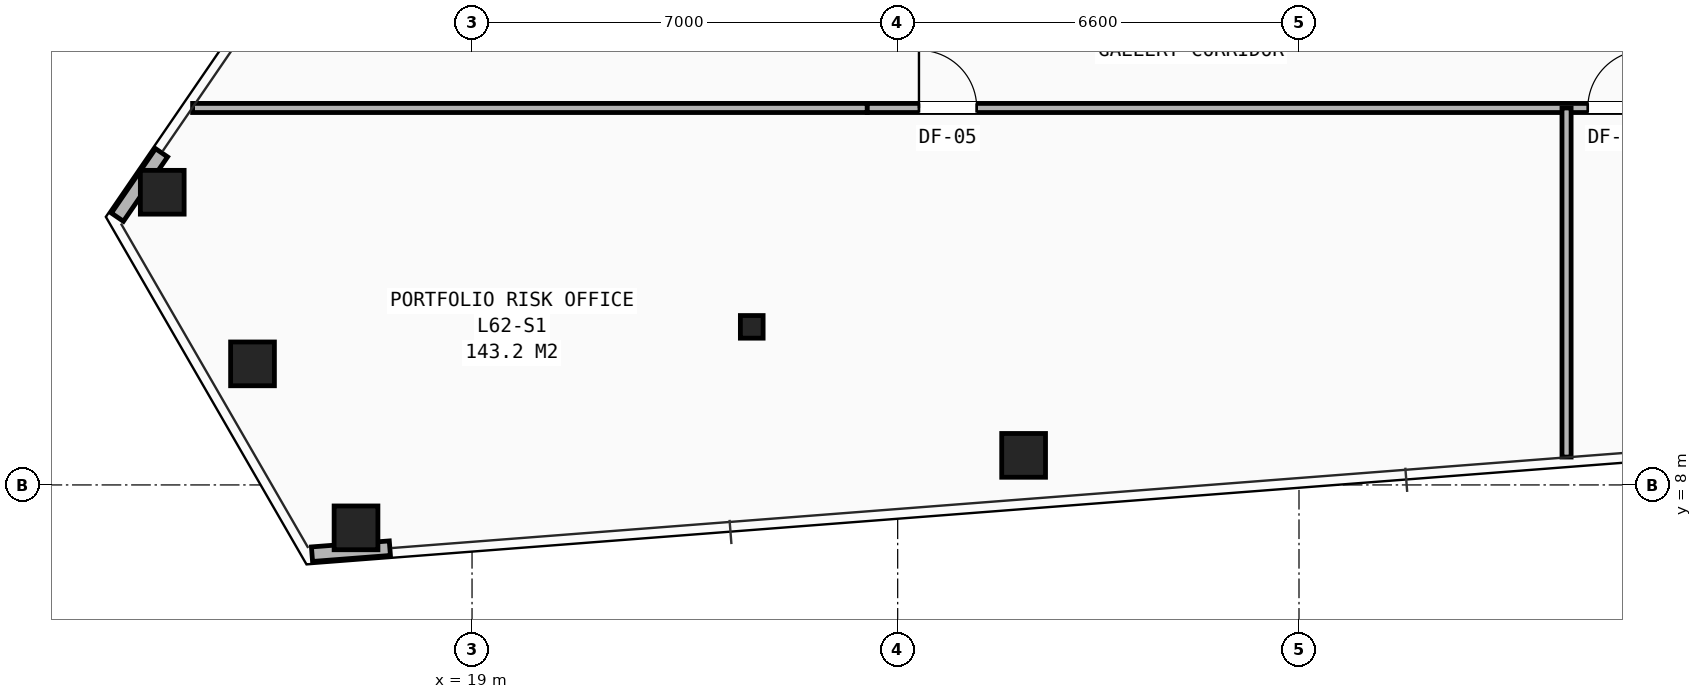
"""IFC4 building model, lengths in metres.
Left out: names, types, materials, properties, quantities, classifications, styles, units other than length and angle.
Written with IfcOpenShell. Run it as: python <this file> out.ifc"""

import sys

from ifc_helpers import new_model, si_unit, direction, frame, frame_2d, origin, origin_2d, place, context, subcontext, project, spatial, rectangle, hollow_rectangle, i_section, extrude, element, fill, save


model = new_model("IFC4")
c1 = context("Model", 3, precision=1e-05, world=origin(), true_north=direction((0.0, 1.0)))
c2 = subcontext(c1, "Body", "Model", "MODEL_VIEW")
j1 = project(units=[si_unit("LENGTHUNIT", "METRE"), si_unit("PLANEANGLEUNIT", "RADIAN")], contexts=[c1])
p1 = place(None, origin())
s1 = spatial("IfcSite", under=j1, at=p1, CompositionType="ELEMENT")
p2 = place(p1, origin())
s2 = spatial("IfcBuilding", under=s1, at=p2, CompositionType="ELEMENT")
p3 = place(p2, frame((0.0, 0.0, 218.9)))
s3 = spatial("IfcBuildingStorey", under=s2, at=p3, CompositionType="ELEMENT", Elevation=218.9)
p4 = place(p3, frame((23.6, 10.6, 0.0), z_axis=(0.0, 0.0, 1.0), x_axis=(1.0, 0.0, 0.0)))
e1 = element("IfcColumn", 1, at=p4, inside=s3, PredefinedType="COLUMN", context=c2, shape_type="SweptSolid", body=[
    extrude(i_section(OverallWidth=0.374, OverallDepth=0.372, WebThickness=0.016, FlangeThickness=0.026, at=origin_2d()), origin(), (0.0, 0.0, 1.0), 3.5),
])
for number, where, z_axis, x_axis in (
    (2, (13.905, 12.814, 0.0), (0.0, 0.0, 1.0), (1.0, 0.0, 0.0)),
    (3, (15.39, 9.991, 0.0), (0.0, 0.0, 1.0), (1.0, 0.0, 0.0)),
    (4, (17.092, 7.294, 0.0), (0.0, 0.0, 1.0), (1.0, 0.0, 0.0)),
    (5, (28.071, 8.486, 0.0), (0.0, 0.0, 1.0), (1.0, 0.0, 0.0)),
):
    element("IfcColumn", number, at=place(p3, frame(where, z_axis=z_axis, x_axis=x_axis)), inside=s3, PredefinedType="COLUMN", context=c2, shape_type="SweptSolid", body=[
        extrude(hollow_rectangle(XDim=0.72, YDim=0.72, WallThickness=0.05, at=origin_2d()), origin(), (0.0, 0.0, 1.0), 3.5),
    ])
p5 = place(p3, frame((13.894, 13.463, 0.0), z_axis=(0.0, 0.0, 1.0), x_axis=(-0.565269764291, -0.824906111978, 0.0)))
e6 = element("IfcWall", 6, at=p5, inside=s3, PredefinedType="SHEAR", context=c2, shape_type="SweptSolid", body=[
    extrude(rectangle(XDim=1.284, YDim=0.24, at=frame_2d((0.642, 0.0))), origin(), (0.0, 0.0, 1.0), 2.623),
])
p6 = place(p3, frame((16.368, 6.861, 0.0), z_axis=(0.0, 0.0, 1.0), x_axis=(0.997033205721, 0.076972635974, 0.0)))
e7 = element("IfcWall", 7, at=p6, inside=s3, PredefinedType="SHEAR", context=c2, shape_type="SweptSolid", body=[
    extrude(rectangle(XDim=1.285, YDim=0.24, at=frame_2d((0.642, 0.0))), origin(), (0.0, 0.0, 1.0), 2.623),
])
p7 = place(p3, frame((14.405, 14.2, 0.0), z_axis=(0.0, 0.0, 1.0), x_axis=(1.0, 0.0, 0.0)))
e8 = element("IfcWall", 8, at=p7, inside=s3, PredefinedType="PARTITIONING", context=c2, shape_type="SweptSolid", body=[
    extrude(rectangle(XDim=11.095, YDim=0.15, at=frame_2d((5.548, 0.0))), origin(), (0.0, 0.0, 1.0), 2.292),
])
p8 = place(p3, frame((25.5, 14.2, 0.0), z_axis=(0.0, 0.0, 1.0), x_axis=(1.0, 0.0, 0.0)))
e9 = element("IfcWall", 9, at=p8, inside=s3, PredefinedType="PARTITIONING", context=c2, shape_type="SweptSolid", body=[
    extrude(rectangle(XDim=29.0, YDim=0.15, at=frame_2d((14.5, 0.0))), origin(), (0.0, 0.0, 1.0), 2.292),
])
p9 = place(p8, frame((0.85, 0.0, 0.0)))
e10 = element("IfcOpeningElement", 10, at=p9, cuts=e9, PredefinedType="OPENING", context=c2, shape_type="SweptSolid", body=[
    extrude(rectangle(XDim=0.95, YDim=2.1, at=frame_2d((0.475, 1.05))), frame((0.0, 0.085, 0.0), z_axis=(0.0, -1.0, 0.0), x_axis=(1.0, 0.0, 0.0)), (0.0, 0.0, 1.0), 0.17),
])
p10 = place(p8, frame((11.85, 0.0, 0.0)))
e11 = element("IfcOpeningElement", 11, at=p10, cuts=e9, PredefinedType="OPENING", context=c2, shape_type="SweptSolid", body=[
    extrude(rectangle(XDim=0.95, YDim=2.1, at=frame_2d((0.475, 1.05))), frame((0.0, 0.085, 0.0), z_axis=(0.0, -1.0, 0.0), x_axis=(1.0, 0.0, 0.0)), (0.0, 0.0, 1.0), 0.17),
])
p11 = place(p3, frame((37.0, 8.458, 0.0), z_axis=(0.0, 0.0, 1.0), x_axis=(0.0, 1.0, 0.0)))
e12 = element("IfcWall", 12, at=p11, inside=s3, PredefinedType="PARTITIONING", context=c2, shape_type="SweptSolid", body=[
    extrude(rectangle(XDim=5.741, YDim=0.15, at=frame_2d((2.871, 0.0))), origin(), (0.0, 0.0, 1.0), 2.292),
])
p12 = place(p9, origin())
e13 = element("IfcDoor", 13, at=p12, inside=s3, OperationType="SINGLE_SWING_LEFT", PredefinedType="DOOR", context=c2, shape_type="SweptSolid", body=[
    extrude(rectangle(XDim=0.95, YDim=2.1, at=frame_2d((0.475, 1.05))), frame((0.0, 0.025, 0.0), z_axis=(0.0, -1.0, 0.0), x_axis=(1.0, 0.0, 0.0)), (0.0, 0.0, 1.0), 0.05),
])
fill(e10, e13)
p13 = place(p10, origin())
e14 = element("IfcDoor", 14, at=p13, inside=s3, OperationType="SINGLE_SWING_RIGHT", PredefinedType="DOOR", context=c2, shape_type="SweptSolid", body=[
    extrude(rectangle(XDim=0.95, YDim=2.1, at=frame_2d((0.475, 1.05))), frame((0.0, 0.025, 0.0), z_axis=(0.0, -1.0, 0.0), x_axis=(1.0, 0.0, 0.0)), (0.0, 0.0, 1.0), 0.05),
])
fill(e11, e14)
save(model, sys.argv[1])
